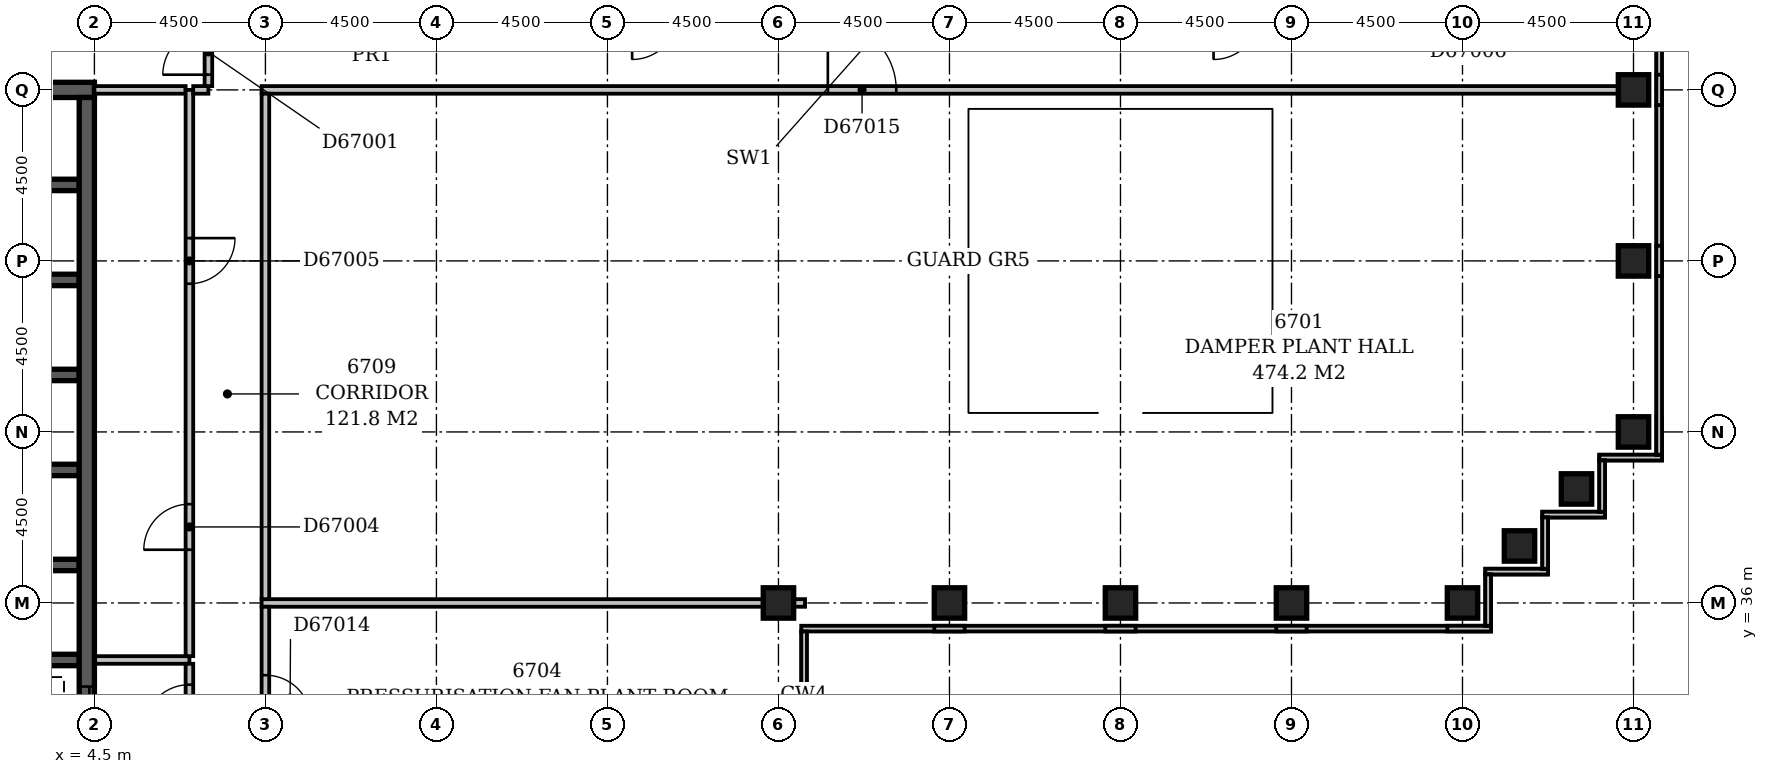
"""IFC4 building model, lengths in metres.
Left out: names, types, materials, properties, quantities, classifications, styles, units other than length and angle.
Written with IfcOpenShell. Run it as: python <this file> out.ifc"""

import sys

from ifc_helpers import new_model, si_unit, direction, frame, frame_2d, origin, origin_2d, place, context, subcontext, project, spatial, rectangle, extrude, element, fill, save


model = new_model("IFC4")
c1 = context("Model", 3, precision=1e-05, world=origin(), true_north=direction((0.0, 1.0)))
c2 = subcontext(c1, "Body", "Model", "MODEL_VIEW")
j1 = project(units=[si_unit("LENGTHUNIT", "METRE"), si_unit("PLANEANGLEUNIT", "RADIAN")], contexts=[c1])
p1 = place(None, origin())
s1 = spatial("IfcSite", under=j1, at=p1, CompositionType="ELEMENT")
p2 = place(p1, origin())
s2 = spatial("IfcBuilding", under=s1, at=p2, CompositionType="ELEMENT")
p3 = place(p2, frame((0.0, 0.0, 258.2)))
s3 = spatial("IfcBuildingStorey", under=s2, at=p3, CompositionType="ELEMENT", Elevation=258.2)
p4 = place(p3, frame((0.3, 49.5, -0.45), z_axis=(0.0, 0.0, 1.0), x_axis=(1.0, 0.0, 0.0)))
e1 = element("IfcWall", 1, at=p4, inside=s3, PredefinedType="SHEAR", context=c2, shape_type="SweptSolid", body=[
    extrude(rectangle(XDim=4.2, YDim=0.4, at=frame_2d((2.1, 0.0))), origin(), (0.0, 0.0, 1.0), 8.05),
])
for number, where, z_axis, x_axis in (
    (2, (0.7, 34.5, -0.45), (0.0, 0.0, 1.0), (1.0, 0.0, 0.0)),
    (3, (0.7, 37.0, -0.45), (0.0, 0.0, 1.0), (1.0, 0.0, 0.0)),
    (4, (0.7, 39.5, -0.45), (0.0, 0.0, 1.0), (1.0, 0.0, 0.0)),
    (5, (0.7, 42.0, -0.45), (0.0, 0.0, 1.0), (1.0, 0.0, 0.0)),
    (6, (0.7, 44.5, -0.45), (0.0, 0.0, 1.0), (1.0, 0.0, 0.0)),
    (7, (0.7, 47.0, -0.45), (0.0, 0.0, 1.0), (1.0, 0.0, 0.0)),
):
    element("IfcWall", number, at=place(p3, frame(where, z_axis=z_axis, x_axis=x_axis)), inside=s3, PredefinedType="SHEAR", context=c2, shape_type="SweptSolid", body=[
        extrude(rectangle(XDim=3.4, YDim=0.3, at=frame_2d((1.7, 0.0))), origin(), (0.0, 0.0, 1.0), 8.05),
    ])
p5 = place(p3, frame((4.3, 27.15, -0.45), z_axis=(0.0, 0.0, 1.0), x_axis=(0.0, 1.0, 0.0)))
e8 = element("IfcWall", 8, at=p5, inside=s3, PredefinedType="SHEAR", context=c2, shape_type="SweptSolid", body=[
    extrude(rectangle(XDim=22.15, YDim=0.4, at=frame_2d((11.075, 0.0))), origin(), (0.0, 0.0, 1.0), 8.05),
])
p6 = place(p5, frame((3.05, 0.0, 0.45)))
e9 = element("IfcOpeningElement", 9, at=p6, cuts=e8, PredefinedType="OPENING", context=c2, shape_type="SweptSolid", body=[
    extrude(rectangle(XDim=1.1, YDim=2.1, at=frame_2d((0.55, 1.05))), frame((0.0, 0.212, 0.0), z_axis=(0.0, -1.0, 0.0), x_axis=(1.0, 0.0, 0.0)), (0.0, 0.0, 1.0), 0.424),
])
p7 = place(p5, frame((0.55, 0.0, 0.45)))
e10 = element("IfcOpeningElement", 10, at=p7, cuts=e8, PredefinedType="OPENING", context=c2, shape_type="SweptSolid", body=[
    extrude(rectangle(XDim=1.1, YDim=2.1, at=frame_2d((0.55, 1.05))), frame((0.0, 0.212, 0.0), z_axis=(0.0, -1.0, 0.0), x_axis=(1.0, 0.0, 0.0)), (0.0, 0.0, 1.0), 0.424),
])
p8 = place(p5, frame((5.55, 0.0, 0.45)))
e11 = element("IfcOpeningElement", 11, at=p8, cuts=e8, PredefinedType="OPENING", context=c2, shape_type="SweptSolid", body=[
    extrude(rectangle(XDim=1.1, YDim=2.1, at=frame_2d((0.55, 1.05))), frame((0.0, 0.212, 0.0), z_axis=(0.0, -1.0, 0.0), x_axis=(1.0, 0.0, 0.0)), (0.0, 0.0, 1.0), 0.424),
])
for number, where, z_axis, x_axis in (
    (12, (22.5, 36.0, -0.45), (0.0, 0.0, 1.0), (1.0, 0.0, 0.0)),
    (13, (27.0, 36.0, -0.45), (0.0, 0.0, 1.0), (1.0, 0.0, 0.0)),
    (14, (31.5, 36.0, -0.45), (0.0, 0.0, 1.0), (1.0, 0.0, 0.0)),
    (15, (36.0, 36.0, -0.45), (0.0, 0.0, 1.0), (1.0, 0.0, 0.0)),
    (16, (40.5, 36.0, -0.45), (0.0, 0.0, 1.0), (1.0, 0.0, 0.0)),
    (17, (42.0, 37.5, -0.45), (0.0, 0.0, 1.0), (1.0, 0.0, 0.0)),
    (18, (43.5, 39.0, -0.45), (0.0, 0.0, 1.0), (1.0, 0.0, 0.0)),
    (19, (45.0, 40.5, -0.45), (0.0, 0.0, 1.0), (1.0, 0.0, 0.0)),
    (20, (45.0, 45.0, -0.45), (0.0, 0.0, 1.0), (1.0, 0.0, 0.0)),
    (21, (45.0, 49.5, -0.45), (0.0, 0.0, 1.0), (1.0, 0.0, 0.0)),
):
    element("IfcColumn", number, at=place(p3, frame(where, z_axis=z_axis, x_axis=x_axis)), inside=s3, PredefinedType="COLUMN", context=c2, shape_type="SweptSolid", body=[
        extrude(rectangle(XDim=0.8, YDim=0.8, at=origin_2d()), origin(), (0.0, 0.0, 1.0), 8.05),
    ])
p9 = place(p3, frame((23.175, 17.4, 0.0), z_axis=(0.0, 0.0, 1.0), x_axis=(0.0, 1.0, 0.0)))
e22 = element("IfcWall", 22, at=p9, inside=s3, PredefinedType="STANDARD", context=c2, shape_type="SweptSolid", body=[
    extrude(rectangle(XDim=17.85, YDim=0.15, at=frame_2d((8.925, 0.0))), origin(), (0.0, 0.0, 1.0), 1.1),
])
p10 = place(p3, frame((23.1, 35.325, 0.0), z_axis=(0.0, 0.0, 1.0), x_axis=(1.0, 0.0, 0.0)))
e23 = element("IfcWall", 23, at=p10, inside=s3, PredefinedType="STANDARD", context=c2, shape_type="SweptSolid", body=[
    extrude(rectangle(XDim=18.15, YDim=0.15, at=frame_2d((9.075, 0.0))), origin(), (0.0, 0.0, 1.0), 1.1),
])
p11 = place(p3, frame((41.175, 35.4, 0.0), z_axis=(0.0, 0.0, 1.0), x_axis=(0.0, 1.0, 0.0)))
e24 = element("IfcWall", 24, at=p11, inside=s3, PredefinedType="STANDARD", context=c2, shape_type="SweptSolid", body=[
    extrude(rectangle(XDim=1.35, YDim=0.15, at=frame_2d((0.675, 0.0))), origin(), (0.0, 0.0, 1.0), 1.1),
])
p12 = place(p3, frame((41.1, 36.825, 0.0), z_axis=(0.0, 0.0, 1.0), x_axis=(1.0, 0.0, 0.0)))
e25 = element("IfcWall", 25, at=p12, inside=s3, PredefinedType="STANDARD", context=c2, shape_type="SweptSolid", body=[
    extrude(rectangle(XDim=1.65, YDim=0.15, at=frame_2d((0.825, 0.0))), origin(), (0.0, 0.0, 1.0), 1.1),
])
p13 = place(p3, frame((42.675, 36.9, 0.0), z_axis=(0.0, 0.0, 1.0), x_axis=(0.0, 1.0, 0.0)))
e26 = element("IfcWall", 26, at=p13, inside=s3, PredefinedType="STANDARD", context=c2, shape_type="SweptSolid", body=[
    extrude(rectangle(XDim=1.35, YDim=0.15, at=frame_2d((0.675, 0.0))), origin(), (0.0, 0.0, 1.0), 1.1),
])
p14 = place(p3, frame((42.6, 38.325, 0.0), z_axis=(0.0, 0.0, 1.0), x_axis=(1.0, 0.0, 0.0)))
e27 = element("IfcWall", 27, at=p14, inside=s3, PredefinedType="STANDARD", context=c2, shape_type="SweptSolid", body=[
    extrude(rectangle(XDim=1.65, YDim=0.15, at=frame_2d((0.825, 0.0))), origin(), (0.0, 0.0, 1.0), 1.1),
])
p15 = place(p3, frame((44.175, 38.4, 0.0), z_axis=(0.0, 0.0, 1.0), x_axis=(0.0, 1.0, 0.0)))
e28 = element("IfcWall", 28, at=p15, inside=s3, PredefinedType="STANDARD", context=c2, shape_type="SweptSolid", body=[
    extrude(rectangle(XDim=1.35, YDim=0.15, at=frame_2d((0.675, 0.0))), origin(), (0.0, 0.0, 1.0), 1.1),
])
p16 = place(p3, frame((44.1, 39.825, 0.0), z_axis=(0.0, 0.0, 1.0), x_axis=(1.0, 0.0, 0.0)))
e29 = element("IfcWall", 29, at=p16, inside=s3, PredefinedType="STANDARD", context=c2, shape_type="SweptSolid", body=[
    extrude(rectangle(XDim=1.65, YDim=0.15, at=frame_2d((0.825, 0.0))), origin(), (0.0, 0.0, 1.0), 1.1),
])
p17 = place(p3, frame((45.675, 39.9, 0.0), z_axis=(0.0, 0.0, 1.0), x_axis=(0.0, 1.0, 0.0)))
e30 = element("IfcWall", 30, at=p17, inside=s3, PredefinedType="STANDARD", context=c2, shape_type="SweptSolid", body=[
    extrude(rectangle(XDim=19.35, YDim=0.15, at=frame_2d((9.675, 0.0))), origin(), (0.0, 0.0, 1.0), 1.1),
])
for number, where, z_axis, x_axis in (
    (31, (26.6, 35.325, 1.1), (0.0, 0.0, 1.0), (1.0, 0.0, 0.0)),
    (32, (31.1, 35.325, 1.1), (0.0, 0.0, 1.0), (1.0, 0.0, 0.0)),
    (33, (35.6, 35.325, 1.1), (0.0, 0.0, 1.0), (1.0, 0.0, 0.0)),
):
    element("IfcWall", number, at=place(p3, frame(where, z_axis=z_axis, x_axis=x_axis)), inside=s3, PredefinedType="STANDARD", context=c2, shape_type="SweptSolid", body=[
        extrude(rectangle(XDim=0.8, YDim=0.15, at=frame_2d((0.4, 0.0))), origin(), (0.0, 0.0, 1.0), 6.0),
    ])
p18 = place(p3, frame((40.1, 35.325, 1.1), z_axis=(0.0, 0.0, 1.0), x_axis=(1.0, 0.0, 0.0)))
e34 = element("IfcWall", 34, at=p18, inside=s3, PredefinedType="STANDARD", context=c2, shape_type="SweptSolid", body=[
    extrude(rectangle(XDim=1.15, YDim=0.15, at=frame_2d((0.575, 0.0))), origin(), (0.0, 0.0, 1.0), 6.0),
])
p19 = place(p3, frame((41.175, 35.4, 1.1), z_axis=(0.0, 0.0, 1.0), x_axis=(0.0, 1.0, 0.0)))
e35 = element("IfcWall", 35, at=p19, inside=s3, PredefinedType="STANDARD", context=c2, shape_type="SweptSolid", body=[
    extrude(rectangle(XDim=1.35, YDim=0.15, at=frame_2d((0.675, 0.0))), origin(), (0.0, 0.0, 1.0), 6.0),
])
p20 = place(p3, frame((41.1, 36.825, 1.1), z_axis=(0.0, 0.0, 1.0), x_axis=(1.0, 0.0, 0.0)))
e36 = element("IfcWall", 36, at=p20, inside=s3, PredefinedType="STANDARD", context=c2, shape_type="SweptSolid", body=[
    extrude(rectangle(XDim=1.65, YDim=0.15, at=frame_2d((0.825, 0.0))), origin(), (0.0, 0.0, 1.0), 6.0),
])
p21 = place(p3, frame((42.675, 36.9, 1.1), z_axis=(0.0, 0.0, 1.0), x_axis=(0.0, 1.0, 0.0)))
e37 = element("IfcWall", 37, at=p21, inside=s3, PredefinedType="STANDARD", context=c2, shape_type="SweptSolid", body=[
    extrude(rectangle(XDim=1.35, YDim=0.15, at=frame_2d((0.675, 0.0))), origin(), (0.0, 0.0, 1.0), 6.0),
])
p22 = place(p3, frame((42.6, 38.325, 1.1), z_axis=(0.0, 0.0, 1.0), x_axis=(1.0, 0.0, 0.0)))
e38 = element("IfcWall", 38, at=p22, inside=s3, PredefinedType="STANDARD", context=c2, shape_type="SweptSolid", body=[
    extrude(rectangle(XDim=1.65, YDim=0.15, at=frame_2d((0.825, 0.0))), origin(), (0.0, 0.0, 1.0), 6.0),
])
p23 = place(p3, frame((44.175, 38.4, 1.1), z_axis=(0.0, 0.0, 1.0), x_axis=(0.0, 1.0, 0.0)))
e39 = element("IfcWall", 39, at=p23, inside=s3, PredefinedType="STANDARD", context=c2, shape_type="SweptSolid", body=[
    extrude(rectangle(XDim=1.35, YDim=0.15, at=frame_2d((0.675, 0.0))), origin(), (0.0, 0.0, 1.0), 6.0),
])
p24 = place(p3, frame((44.1, 39.825, 1.1), z_axis=(0.0, 0.0, 1.0), x_axis=(1.0, 0.0, 0.0)))
e40 = element("IfcWall", 40, at=p24, inside=s3, PredefinedType="STANDARD", context=c2, shape_type="SweptSolid", body=[
    extrude(rectangle(XDim=1.65, YDim=0.15, at=frame_2d((0.825, 0.0))), origin(), (0.0, 0.0, 1.0), 6.0),
])
p25 = place(p3, frame((45.675, 39.9, 1.1), z_axis=(0.0, 0.0, 1.0), x_axis=(0.0, 1.0, 0.0)))
e41 = element("IfcWall", 41, at=p25, inside=s3, PredefinedType="STANDARD", context=c2, shape_type="SweptSolid", body=[
    extrude(rectangle(XDim=1.0, YDim=0.15, at=frame_2d((0.5, 0.0))), origin(), (0.0, 0.0, 1.0), 6.0),
])
for number, where, z_axis, x_axis in (
    (42, (45.675, 44.6, 1.1), (0.0, 0.0, 1.0), (0.0, 1.0, 0.0)),
    (43, (45.675, 49.1, 1.1), (0.0, 0.0, 1.0), (0.0, 1.0, 0.0)),
):
    element("IfcWall", number, at=place(p3, frame(where, z_axis=z_axis, x_axis=x_axis)), inside=s3, PredefinedType="STANDARD", context=c2, shape_type="SweptSolid", body=[
        extrude(rectangle(XDim=0.8, YDim=0.15, at=frame_2d((0.4, 0.0))), origin(), (0.0, 0.0, 1.0), 6.0),
    ])
p26 = place(p3, frame((4.52, 34.5, 0.0), z_axis=(0.0, 0.0, 1.0), x_axis=(1.0, 0.0, 0.0)))
e44 = element("IfcWall", 44, at=p26, inside=s3, PredefinedType="PARTITIONING", context=c2, shape_type="SweptSolid", body=[
    extrude(rectangle(XDim=2.48, YDim=0.2, at=frame_2d((1.24, 0.0))), origin(), (0.0, 0.0, 1.0), 7.6),
])
p27 = place(p3, frame((7.0, 34.6, 0.0), z_axis=(0.0, 0.0, 1.0), x_axis=(0.0, 1.0, 0.0)))
e45 = element("IfcWall", 45, at=p27, inside=s3, PredefinedType="PARTITIONING", context=c2, shape_type="SweptSolid", body=[
    extrude(rectangle(XDim=14.9, YDim=0.2, at=frame_2d((7.45, 0.0))), origin(), (0.0, 0.0, 1.0), 7.6),
])
p28 = place(p27, frame((2.8, 0.0, 0.0)))
e46 = element("IfcOpeningElement", 46, at=p28, cuts=e45, PredefinedType="OPENING", context=c2, shape_type="SweptSolid", body=[
    extrude(rectangle(XDim=1.2, YDim=2.1, at=frame_2d((0.6, 1.05))), frame((0.0, 0.112, 0.0), z_axis=(0.0, -1.0, 0.0), x_axis=(1.0, 0.0, 0.0)), (0.0, 0.0, 1.0), 0.224),
])
p29 = place(p27, frame((9.8, 0.0, 0.0)))
e47 = element("IfcOpeningElement", 47, at=p29, cuts=e45, PredefinedType="OPENING", context=c2, shape_type="SweptSolid", body=[
    extrude(rectangle(XDim=1.2, YDim=2.1, at=frame_2d((0.6, 1.05))), frame((0.0, 0.112, 0.0), z_axis=(0.0, -1.0, 0.0), x_axis=(1.0, 0.0, 0.0)), (0.0, 0.0, 1.0), 0.224),
])
p30 = place(p3, frame((4.5, 49.5, 0.0), z_axis=(0.0, 0.0, 1.0), x_axis=(1.0, 0.0, 0.0)))
e48 = element("IfcWall", 48, at=p30, inside=s3, PredefinedType="PARTITIONING", context=c2, shape_type="SweptSolid", body=[
    extrude(rectangle(XDim=2.4, YDim=0.2, at=frame_2d((1.2, 0.0))), origin(), (0.0, 0.0, 1.0), 7.6),
])
p31 = place(p3, frame((7.0, 32.1, 0.0), z_axis=(0.0, 0.0, 1.0), x_axis=(0.0, 1.0, 0.0)))
e49 = element("IfcWall", 49, at=p31, inside=s3, PredefinedType="PARTITIONING", context=c2, shape_type="SweptSolid", body=[
    extrude(rectangle(XDim=2.3, YDim=0.2, at=frame_2d((1.15, 0.0))), origin(), (0.0, 0.0, 1.0), 7.6),
])
p32 = place(p31, frame((0.55, 0.0, 0.0)))
e50 = element("IfcOpeningElement", 50, at=p32, cuts=e49, PredefinedType="OPENING", context=c2, shape_type="SweptSolid", body=[
    extrude(rectangle(XDim=1.2, YDim=2.1, at=frame_2d((0.6, 1.05))), frame((0.0, 0.112, 0.0), z_axis=(0.0, -1.0, 0.0), x_axis=(1.0, 0.0, 0.0)), (0.0, 0.0, 1.0), 0.224),
])
p33 = place(p3, frame((7.1, 49.5, 0.0), z_axis=(0.0, 0.0, 1.0), x_axis=(1.0, 0.0, 0.0)))
e51 = element("IfcWall", 51, at=p33, inside=s3, PredefinedType="PARTITIONING", context=c2, shape_type="SweptSolid", body=[
    extrude(rectangle(XDim=0.4, YDim=0.2, at=frame_2d((0.2, 0.0))), origin(), (0.0, 0.0, 1.0), 7.6),
])
p34 = place(p3, frame((7.5, 49.6, 0.0), z_axis=(0.0, 0.0, 1.0), x_axis=(0.0, 1.0, 0.0)))
e52 = element("IfcWall", 52, at=p34, inside=s3, PredefinedType="PARTITIONING", context=c2, shape_type="SweptSolid", body=[
    extrude(rectangle(XDim=3.9, YDim=0.2, at=frame_2d((1.95, 0.0))), origin(), (0.0, 0.0, 1.0), 7.6),
])
p35 = place(p34, frame((0.3, 0.0, 0.0)))
e53 = element("IfcOpeningElement", 53, at=p35, cuts=e52, PredefinedType="OPENING", context=c2, shape_type="SweptSolid", body=[
    extrude(rectangle(XDim=1.2, YDim=2.1, at=frame_2d((0.6, 1.05))), frame((0.0, 0.112, 0.0), z_axis=(0.0, -1.0, 0.0), x_axis=(1.0, 0.0, 0.0)), (0.0, 0.0, 1.0), 0.224),
])
p36 = place(p3, frame((9.0, 31.1, 0.0), z_axis=(0.0, 0.0, 1.0), x_axis=(0.0, 1.0, 0.0)))
e54 = element("IfcWall", 54, at=p36, inside=s3, PredefinedType="PARTITIONING", context=c2, shape_type="SweptSolid", body=[
    extrude(rectangle(XDim=4.8, YDim=0.2, at=frame_2d((2.4, 0.0))), origin(), (0.0, 0.0, 1.0), 7.6),
])
p37 = place(p36, frame((1.8, 0.0, 0.0)))
e55 = element("IfcOpeningElement", 55, at=p37, cuts=e54, PredefinedType="OPENING", context=c2, shape_type="SweptSolid", body=[
    extrude(rectangle(XDim=1.2, YDim=2.1, at=frame_2d((0.6, 1.05))), frame((0.0, 0.112, 0.0), z_axis=(0.0, -1.0, 0.0), x_axis=(1.0, 0.0, 0.0)), (0.0, 0.0, 1.0), 0.224),
])
p38 = place(p3, frame((9.0, 36.1, 0.0), z_axis=(0.0, 0.0, 1.0), x_axis=(0.0, 1.0, 0.0)))
e56 = element("IfcWall", 56, at=p38, inside=s3, PredefinedType="PARTITIONING", context=c2, shape_type="SweptSolid", body=[
    extrude(rectangle(XDim=13.3, YDim=0.2, at=frame_2d((6.65, 0.0))), origin(), (0.0, 0.0, 1.0), 7.6),
])
p39 = place(p3, frame((22.5, 36.0, 0.0), z_axis=(0.0, 0.0, 1.0), x_axis=(-1.0, 0.0, 0.0)))
e57 = element("IfcWall", 57, at=p39, inside=s3, PredefinedType="PARTITIONING", context=c2, shape_type="SweptSolid", body=[
    extrude(rectangle(XDim=13.6, YDim=0.2, at=frame_2d((6.8, 0.0))), origin(), (0.0, 0.0, 1.0), 7.6),
])
p40 = place(p3, frame((23.2, 36.0, 0.0), z_axis=(0.0, 0.0, 1.0), x_axis=(-1.0, 0.0, 0.0)))
e58 = element("IfcWall", 58, at=p40, inside=s3, PredefinedType="PARTITIONING", context=c2, shape_type="SweptSolid", body=[
    extrude(rectangle(XDim=0.7, YDim=0.2, at=frame_2d((0.35, 0.0))), origin(), (0.0, 0.0, 1.0), 7.1),
])
p41 = place(p3, frame((8.9, 49.5, 0.0), z_axis=(0.0, 0.0, 1.0), x_axis=(1.0, 0.0, 0.0)))
e59 = element("IfcWall", 59, at=p41, inside=s3, PredefinedType="PARTITIONING", context=c2, shape_type="SweptSolid", body=[
    extrude(rectangle(XDim=36.1, YDim=0.2, at=frame_2d((18.05, 0.0))), origin(), (0.0, 0.0, 1.0), 7.6),
])
p42 = place(p41, frame((14.9, 0.0, 0.0)))
e60 = element("IfcOpeningElement", 60, at=p42, cuts=e59, PredefinedType="OPENING", context=c2, shape_type="SweptSolid", body=[
    extrude(rectangle(XDim=1.8, YDim=2.4, at=frame_2d((0.9, 1.2))), frame((0.0, 0.112, 0.0), z_axis=(0.0, -1.0, 0.0), x_axis=(1.0, 0.0, 0.0)), (0.0, 0.0, 1.0), 0.224),
])
p43 = place(p35, origin())
e61 = element("IfcDoor", 61, at=p43, inside=s3, OperationType="SINGLE_SWING_LEFT", PredefinedType="DOOR", context=c2, shape_type="SweptSolid", body=[
    extrude(rectangle(XDim=1.2, YDim=2.1, at=frame_2d((0.6, 1.05))), frame((0.0, 0.025, 0.0), z_axis=(0.0, -1.0, 0.0), x_axis=(1.0, 0.0, 0.0)), (0.0, 0.0, 1.0), 0.05),
])
fill(e53, e61)
p44 = place(p28, origin())
e62 = element("IfcDoor", 62, at=p44, inside=s3, OperationType="SINGLE_SWING_LEFT", PredefinedType="DOOR", context=c2, shape_type="SweptSolid", body=[
    extrude(rectangle(XDim=1.2, YDim=2.1, at=frame_2d((0.6, 1.05))), frame((0.0, 0.025, 0.0), z_axis=(0.0, -1.0, 0.0), x_axis=(1.0, 0.0, 0.0)), (0.0, 0.0, 1.0), 0.05),
])
fill(e46, e62)
p45 = place(p29, origin())
e63 = element("IfcDoor", 63, at=p45, inside=s3, OperationType="SINGLE_SWING_RIGHT", PredefinedType="DOOR", context=c2, shape_type="SweptSolid", body=[
    extrude(rectangle(XDim=1.2, YDim=2.1, at=frame_2d((0.6, 1.05))), frame((0.0, 0.025, 0.0), z_axis=(0.0, -1.0, 0.0), x_axis=(1.0, 0.0, 0.0)), (0.0, 0.0, 1.0), 0.05),
])
fill(e47, e63)
p46 = place(p32, origin())
e64 = element("IfcDoor", 64, at=p46, inside=s3, OperationType="SINGLE_SWING_LEFT", PredefinedType="DOOR", context=c2, shape_type="SweptSolid", body=[
    extrude(rectangle(XDim=1.2, YDim=2.1, at=frame_2d((0.6, 1.05))), frame((0.0, 0.025, 0.0), z_axis=(0.0, -1.0, 0.0), x_axis=(1.0, 0.0, 0.0)), (0.0, 0.0, 1.0), 0.05),
])
fill(e50, e64)
p47 = place(p8, origin())
e65 = element("IfcDoor", 65, at=p47, inside=s3, OperationType="SLIDING_TO_LEFT", PredefinedType="DOOR", context=c2, shape_type="SweptSolid", body=[
    extrude(rectangle(XDim=1.1, YDim=2.1, at=frame_2d((0.55, 1.05))), frame((0.0, 0.025, 0.0), z_axis=(0.0, -1.0, 0.0), x_axis=(1.0, 0.0, 0.0)), (0.0, 0.0, 1.0), 0.05),
])
fill(e11, e65)
p48 = place(p37, frame((1.2, 0.0, 0.0), z_axis=(0.0, 0.0, 1.0), x_axis=(-1.0, 0.0, 0.0)))
e66 = element("IfcDoor", 66, at=p48, inside=s3, OperationType="SINGLE_SWING_RIGHT", PredefinedType="DOOR", context=c2, shape_type="SweptSolid", body=[
    extrude(rectangle(XDim=1.2, YDim=2.1, at=frame_2d((0.6, 1.05))), frame((0.0, 0.025, 0.0), z_axis=(0.0, -1.0, 0.0), x_axis=(1.0, 0.0, 0.0)), (0.0, 0.0, 1.0), 0.05),
])
fill(e55, e66)
p49 = place(p42, origin())
e67 = element("IfcDoor", 67, at=p49, inside=s3, OperationType="DOUBLE_DOOR_SINGLE_SWING", PredefinedType="DOOR", context=c2, shape_type="SweptSolid", body=[
    extrude(rectangle(XDim=1.8, YDim=2.4, at=frame_2d((0.9, 1.2))), frame((0.0, 0.025, 0.0), z_axis=(0.0, -1.0, 0.0), x_axis=(1.0, 0.0, 0.0)), (0.0, 0.0, 1.0), 0.05),
])
fill(e60, e67)
save(model, sys.argv[1])
